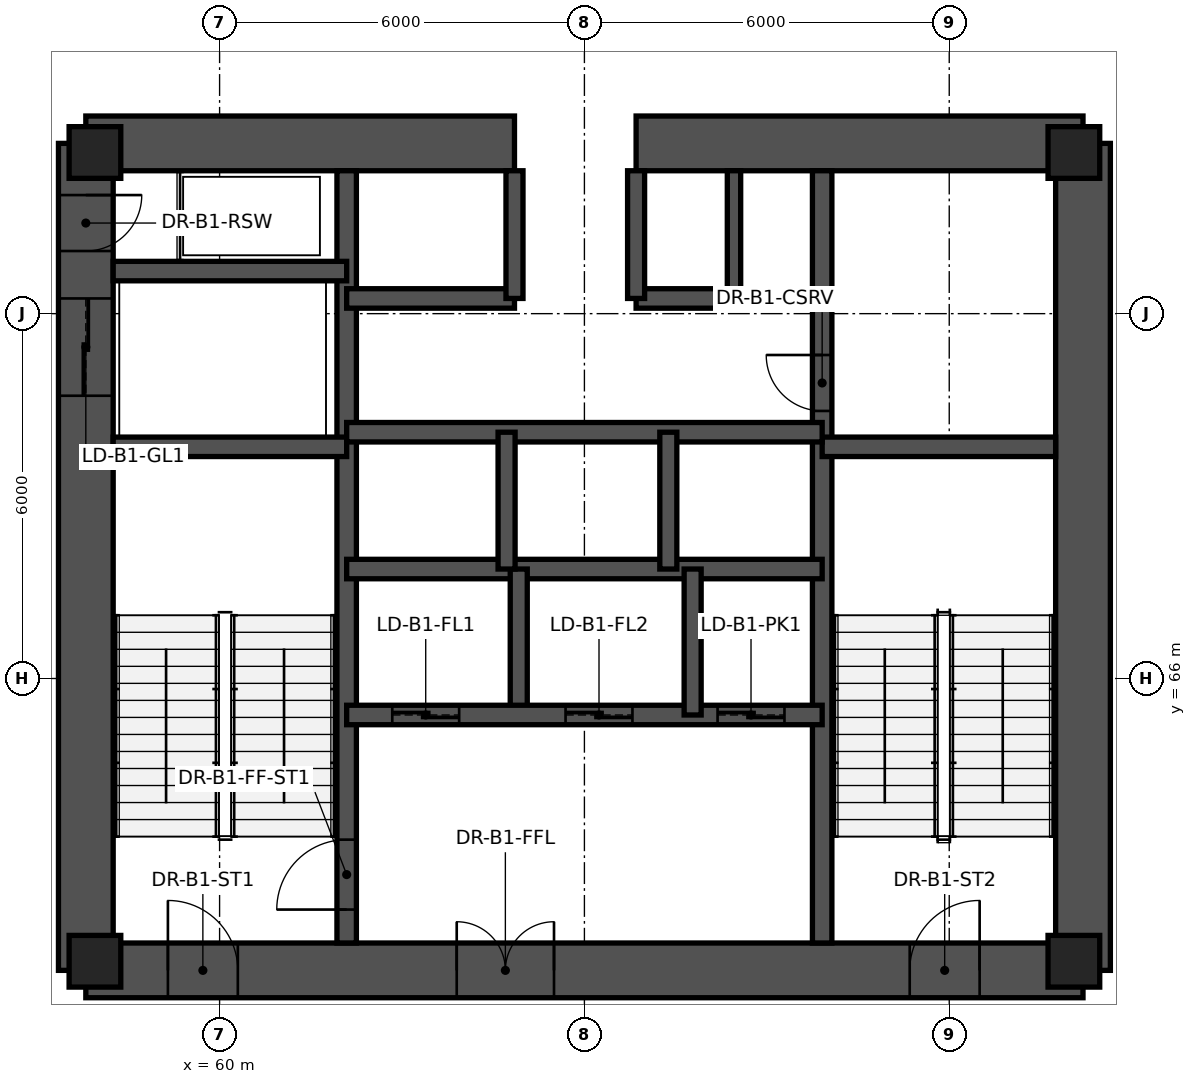
"""IFC4 building model, lengths in metres.
Left out: names, types, materials, properties, quantities, classifications, styles, units other than length and angle.
Written with IfcOpenShell. Run it as: python <this file> out.ifc"""

import sys

from ifc_helpers import new_model, si_unit, direction, frame, frame_2d, origin, origin_2d, place, context, subcontext, project, spatial, rectangle, extrude, element, fill, save


model = new_model("IFC4")
c1 = context("Model", 3, precision=1e-05, world=origin(), true_north=direction((0.0, 1.0)))
c2 = subcontext(c1, "Body", "Model", "MODEL_VIEW")
j1 = project(units=[si_unit("LENGTHUNIT", "METRE"), si_unit("PLANEANGLEUNIT", "RADIAN")], contexts=[c1])
p1 = place(None, origin())
s1 = spatial("IfcSite", under=j1, at=p1, CompositionType="ELEMENT")
p2 = place(p1, origin())
s2 = spatial("IfcBuilding", under=s1, at=p2, CompositionType="ELEMENT")
p3 = place(p2, frame((0.0, 0.0, -4.8)))
s3 = spatial("IfcBuildingStorey", under=s2, at=p3, CompositionType="ELEMENT", Elevation=-4.8)
p4 = place(p3, frame((57.8, 61.2, 0.0), z_axis=(0.0, 0.0, 1.0), x_axis=(1.0, 0.0, 0.0)))
e1 = element("IfcWall", 1, at=p4, inside=s3, PredefinedType="SHEAR", context=c2, shape_type="SweptSolid", body=[
    extrude(rectangle(XDim=16.4, YDim=0.9, at=frame_2d((8.2, 0.0))), origin(), (0.0, 0.0, 1.0), 4.8),
])
p5 = place(p4, frame((1.35, 0.0, 0.0)))
e2 = element("IfcOpeningElement", 2, at=p5, cuts=e1, PredefinedType="OPENING", context=c2, shape_type="SweptSolid", body=[
    extrude(rectangle(XDim=1.15, YDim=2.15, at=frame_2d((0.575, 1.075))), frame((0.0, 0.46, 0.0), z_axis=(0.0, -1.0, 0.0), x_axis=(1.0, 0.0, 0.0)), (0.0, 0.0, 1.0), 0.92),
])
p6 = place(p4, frame((6.1, 0.0, 0.0)))
e3 = element("IfcOpeningElement", 3, at=p6, cuts=e1, PredefinedType="OPENING", context=c2, shape_type="SweptSolid", body=[
    extrude(rectangle(XDim=1.6, YDim=2.15, at=frame_2d((0.8, 1.075))), frame((0.0, 0.46, 0.0), z_axis=(0.0, -1.0, 0.0), x_axis=(1.0, 0.0, 0.0)), (0.0, 0.0, 1.0), 0.92),
])
p7 = place(p4, frame((13.55, 0.0, 0.0)))
e4 = element("IfcOpeningElement", 4, at=p7, cuts=e1, PredefinedType="OPENING", context=c2, shape_type="SweptSolid", body=[
    extrude(rectangle(XDim=1.15, YDim=2.15, at=frame_2d((0.575, 1.075))), frame((0.0, 0.46, 0.0), z_axis=(0.0, -1.0, 0.0), x_axis=(1.0, 0.0, 0.0)), (0.0, 0.0, 1.0), 0.92),
])
p8 = place(p3, frame((74.2, 61.2, 0.0), z_axis=(0.0, 0.0, 1.0), x_axis=(0.0, 1.0, 0.0)))
e5 = element("IfcWall", 5, at=p8, inside=s3, PredefinedType="SHEAR", context=c2, shape_type="SweptSolid", body=[
    extrude(rectangle(XDim=13.6, YDim=0.9, at=frame_2d((6.8, 0.0))), origin(), (0.0, 0.0, 1.0), 4.8),
])
p9 = place(p3, frame((74.2, 74.8, 0.0), z_axis=(0.0, 0.0, 1.0), x_axis=(-1.0, 0.0, 0.0)))
e6 = element("IfcWall", 6, at=p9, inside=s3, PredefinedType="SHEAR", context=c2, shape_type="SweptSolid", body=[
    extrude(rectangle(XDim=7.35, YDim=0.9, at=frame_2d((3.675, 0.0))), origin(), (0.0, 0.0, 1.0), 4.8),
])
p10 = place(p3, frame((64.85, 74.8, 0.0), z_axis=(0.0, 0.0, 1.0), x_axis=(-1.0, 0.0, 0.0)))
e7 = element("IfcWall", 7, at=p10, inside=s3, PredefinedType="SHEAR", context=c2, shape_type="SweptSolid", body=[
    extrude(rectangle(XDim=7.05, YDim=0.9, at=frame_2d((3.525, 0.0))), origin(), (0.0, 0.0, 1.0), 4.8),
])
p11 = place(p3, frame((57.8, 74.8, 0.0), z_axis=(0.0, 0.0, 1.0), x_axis=(0.0, -1.0, 0.0)))
e8 = element("IfcWall", 8, at=p11, inside=s3, PredefinedType="SHEAR", context=c2, shape_type="SweptSolid", body=[
    extrude(rectangle(XDim=13.6, YDim=0.9, at=frame_2d((6.8, 0.0))), origin(), (0.0, 0.0, 1.0), 4.8),
])
p12 = place(p11, frame((0.85, 0.0, 0.0)))
e9 = element("IfcOpeningElement", 9, at=p12, cuts=e8, PredefinedType="OPENING", context=c2, shape_type="SweptSolid", body=[
    extrude(rectangle(XDim=0.92, YDim=2.05, at=frame_2d((0.46, 1.025))), frame((0.0, 0.46, 0.0), z_axis=(0.0, -1.0, 0.0), x_axis=(1.0, 0.0, 0.0)), (0.0, 0.0, 1.0), 0.92),
])
p13 = place(p11, frame((2.55, 0.0, 0.0)))
e10 = element("IfcOpeningElement", 10, at=p13, cuts=e8, PredefinedType="OPENING", context=c2, shape_type="SweptSolid", body=[
    extrude(rectangle(XDim=1.6, YDim=2.3, at=frame_2d((0.8, 1.15))), frame((0.0, 0.46, 0.0), z_axis=(0.0, -1.0, 0.0), x_axis=(1.0, 0.0, 0.0)), (0.0, 0.0, 1.0), 0.92),
])
p14 = place(p3, frame((62.09, 61.65, 0.0), z_axis=(0.0, 0.0, 1.0), x_axis=(0.0, 1.0, 0.0)))
e11 = element("IfcWall", 11, at=p14, inside=s3, PredefinedType="SHEAR", context=c2, shape_type="SweptSolid", body=[
    extrude(rectangle(XDim=12.7, YDim=0.32, at=frame_2d((6.35, 0.0))), origin(), (0.0, 0.0, 1.0), 4.8),
])
p15 = place(p14, frame((0.55, 0.0, 0.0)))
e12 = element("IfcOpeningElement", 12, at=p15, cuts=e11, PredefinedType="OPENING", context=c2, shape_type="SweptSolid", body=[
    extrude(rectangle(XDim=1.15, YDim=2.15, at=frame_2d((0.575, 1.075))), frame((0.0, 0.17, 0.0), z_axis=(0.0, -1.0, 0.0), x_axis=(1.0, 0.0, 0.0)), (0.0, 0.0, 1.0), 0.34),
])
p16 = place(p3, frame((69.91, 61.65, 0.0), z_axis=(0.0, 0.0, 1.0), x_axis=(0.0, 1.0, 0.0)))
e13 = element("IfcWall", 13, at=p16, inside=s3, PredefinedType="SHEAR", context=c2, shape_type="SweptSolid", body=[
    extrude(rectangle(XDim=12.7, YDim=0.32, at=frame_2d((6.35, 0.0))), origin(), (0.0, 0.0, 1.0), 4.8),
])
p17 = place(p16, frame((8.75, 0.0, 0.0)))
e14 = element("IfcOpeningElement", 14, at=p17, cuts=e13, PredefinedType="OPENING", context=c2, shape_type="SweptSolid", body=[
    extrude(rectangle(XDim=0.92, YDim=2.05, at=frame_2d((0.46, 1.025))), frame((0.0, 0.17, 0.0), z_axis=(0.0, -1.0, 0.0), x_axis=(1.0, 0.0, 0.0)), (0.0, 0.0, 1.0), 0.34),
])
for number, where, z_axis, x_axis in (
    (15, (58.25, 69.81, 0.0), (0.0, 0.0, 1.0), (1.0, 0.0, 0.0)),
    (16, (69.91, 69.81, 0.0), (0.0, 0.0, 1.0), (1.0, 0.0, 0.0)),
    (17, (58.25, 72.7, 0.0), (0.0, 0.0, 1.0), (1.0, 0.0, 0.0)),
):
    element("IfcWall", number, at=place(p3, frame(where, z_axis=z_axis, x_axis=x_axis)), inside=s3, PredefinedType="SHEAR", context=c2, shape_type="SweptSolid", body=[
        extrude(rectangle(XDim=3.84, YDim=0.32, at=frame_2d((1.92, 0.0))), origin(), (0.0, 0.0, 1.0), 4.8),
    ])
p18 = place(p3, frame((62.09, 67.8, 0.0), z_axis=(0.0, 0.0, 1.0), x_axis=(1.0, 0.0, 0.0)))
e18 = element("IfcWall", 18, at=p18, inside=s3, PredefinedType="SHEAR", context=c2, shape_type="SweptSolid", body=[
    extrude(rectangle(XDim=7.82, YDim=0.32, at=frame_2d((3.91, 0.0))), origin(), (0.0, 0.0, 1.0), 4.8),
])
p19 = place(p3, frame((64.92, 65.4, 0.0), z_axis=(0.0, 0.0, 1.0), x_axis=(0.0, 1.0, 0.0)))
e19 = element("IfcWall", 19, at=p19, inside=s3, PredefinedType="SHEAR", context=c2, shape_type="SweptSolid", body=[
    extrude(rectangle(XDim=2.4, YDim=0.28, at=frame_2d((1.2, 0.0))), origin(), (0.0, 0.0, 1.0), 4.8),
])
p20 = place(p3, frame((62.09, 70.05, 0.0), z_axis=(0.0, 0.0, 1.0), x_axis=(1.0, 0.0, 0.0)))
e20 = element("IfcWall", 20, at=p20, inside=s3, PredefinedType="SHEAR", context=c2, shape_type="SweptSolid", body=[
    extrude(rectangle(XDim=7.82, YDim=0.32, at=frame_2d((3.91, 0.0))), origin(), (0.0, 0.0, 1.0), 4.8),
])
p21 = place(p3, frame((62.09, 72.25, 0.0), z_axis=(0.0, 0.0, 1.0), x_axis=(1.0, 0.0, 0.0)))
e21 = element("IfcWall", 21, at=p21, inside=s3, PredefinedType="SHEAR", context=c2, shape_type="SweptSolid", body=[
    extrude(rectangle(XDim=2.76, YDim=0.32, at=frame_2d((1.38, 0.0))), origin(), (0.0, 0.0, 1.0), 4.8),
])
p22 = place(p3, frame((66.85, 72.25, 0.0), z_axis=(0.0, 0.0, 1.0), x_axis=(1.0, 0.0, 0.0)))
e22 = element("IfcWall", 22, at=p22, inside=s3, PredefinedType="SHEAR", context=c2, shape_type="SweptSolid", body=[
    extrude(rectangle(XDim=3.06, YDim=0.32, at=frame_2d((1.53, 0.0))), origin(), (0.0, 0.0, 1.0), 4.8),
])
for number, where, z_axis, x_axis in (
    (23, (64.85, 72.25, 0.0), (0.0, 0.0, 1.0), (0.0, 1.0, 0.0)),
    (24, (66.85, 72.25, 0.0), (0.0, 0.0, 1.0), (0.0, 1.0, 0.0)),
):
    element("IfcWall", number, at=place(p3, frame(where, z_axis=z_axis, x_axis=x_axis)), inside=s3, PredefinedType="SHEAR", context=c2, shape_type="SweptSolid", body=[
        extrude(rectangle(XDim=2.1, YDim=0.28, at=frame_2d((1.05, 0.0))), origin(), (0.0, 0.0, 1.0), 4.8),
    ])
p23 = place(p3, frame((68.46, 72.25, 0.0), z_axis=(0.0, 0.0, 1.0), x_axis=(0.0, 1.0, 0.0)))
e25 = element("IfcWall", 25, at=p23, inside=s3, PredefinedType="SHEAR", context=c2, shape_type="SweptSolid", body=[
    extrude(rectangle(XDim=2.1, YDim=0.22, at=frame_2d((1.05, 0.0))), origin(), (0.0, 0.0, 1.0), 4.8),
])
p24 = place(p3, frame((62.09, 65.4, 0.0), z_axis=(0.0, 0.0, 1.0), x_axis=(1.0, 0.0, 0.0)))
e26 = element("IfcWall", 26, at=p24, inside=s3, PredefinedType="SHEAR", context=c2, shape_type="SweptSolid", body=[
    extrude(rectangle(XDim=7.82, YDim=0.32, at=frame_2d((3.91, 0.0))), origin(), (0.0, 0.0, 1.0), 4.8),
])
p25 = place(p24, frame((6.1, 0.0, 0.0)))
e27 = element("IfcOpeningElement", 27, at=p25, cuts=e26, PredefinedType="OPENING", context=c2, shape_type="SweptSolid", body=[
    extrude(rectangle(XDim=1.1, YDim=2.2, at=frame_2d((0.55, 1.1))), frame((0.0, 0.17, 0.0), z_axis=(0.0, -1.0, 0.0), x_axis=(1.0, 0.0, 0.0)), (0.0, 0.0, 1.0), 0.34),
])
p26 = place(p24, frame((0.75, 0.0, 0.0)))
e28 = element("IfcOpeningElement", 28, at=p26, cuts=e26, PredefinedType="OPENING", context=c2, shape_type="SweptSolid", body=[
    extrude(rectangle(XDim=1.1, YDim=2.2, at=frame_2d((0.55, 1.1))), frame((0.0, 0.17, 0.0), z_axis=(0.0, -1.0, 0.0), x_axis=(1.0, 0.0, 0.0)), (0.0, 0.0, 1.0), 0.34),
])
p27 = place(p24, frame((3.6, 0.0, 0.0)))
e29 = element("IfcOpeningElement", 29, at=p27, cuts=e26, PredefinedType="OPENING", context=c2, shape_type="SweptSolid", body=[
    extrude(rectangle(XDim=1.1, YDim=2.2, at=frame_2d((0.55, 1.1))), frame((0.0, 0.17, 0.0), z_axis=(0.0, -1.0, 0.0), x_axis=(1.0, 0.0, 0.0)), (0.0, 0.0, 1.0), 0.34),
])
p28 = place(p3, frame((67.78, 65.4, 0.0), z_axis=(0.0, 0.0, 1.0), x_axis=(0.0, 1.0, 0.0)))
e30 = element("IfcWall", 30, at=p28, inside=s3, PredefinedType="SHEAR", context=c2, shape_type="SweptSolid", body=[
    extrude(rectangle(XDim=2.4, YDim=0.28, at=frame_2d((1.2, 0.0))), origin(), (0.0, 0.0, 1.0), 4.8),
])
for number, where, z_axis, x_axis in (
    (31, (64.72, 67.8, 0.0), (0.0, 0.0, 1.0), (0.0, 1.0, 0.0)),
    (32, (67.38, 67.8, 0.0), (0.0, 0.0, 1.0), (0.0, 1.0, 0.0)),
):
    element("IfcWall", number, at=place(p3, frame(where, z_axis=z_axis, x_axis=x_axis)), inside=s3, PredefinedType="SHEAR", context=c2, shape_type="SweptSolid", body=[
        extrude(rectangle(XDim=2.25, YDim=0.28, at=frame_2d((1.125, 0.0))), origin(), (0.0, 0.0, 1.0), 4.8),
    ])
for number, where, z_axis, x_axis in (
    (33, (57.95, 61.35, 0.0), (0.0, 0.0, 1.0), (1.0, 0.0, 0.0)),
    (34, (74.05, 61.35, 0.0), (0.0, 0.0, 1.0), (1.0, 0.0, 0.0)),
    (35, (74.05, 74.65, 0.0), (0.0, 0.0, 1.0), (1.0, 0.0, 0.0)),
    (36, (57.95, 74.65, 0.0), (0.0, 0.0, 1.0), (1.0, 0.0, 0.0)),
):
    element("IfcColumn", number, at=place(p3, frame(where, z_axis=z_axis, x_axis=x_axis)), inside=s3, PredefinedType="COLUMN", context=c2, shape_type="SweptSolid", body=[
        extrude(rectangle(XDim=0.85, YDim=0.85, at=origin_2d()), origin(), (0.0, 0.0, 1.0), 4.8),
    ])
p29 = place(p15, origin())
e37 = element("IfcDoor", 37, at=p29, inside=s3, OperationType="SINGLE_SWING_LEFT", PredefinedType="DOOR", context=c2, shape_type="SweptSolid", body=[
    extrude(rectangle(XDim=1.15, YDim=2.15, at=frame_2d((0.575, 1.075))), frame((0.0, 0.025, 0.0), z_axis=(0.0, -1.0, 0.0), x_axis=(1.0, 0.0, 0.0)), (0.0, 0.0, 1.0), 0.05),
])
fill(e12, e37)
p30 = place(p25, origin())
e38 = element("IfcDoor", 38, at=p30, inside=s3, OperationType="SLIDING_TO_LEFT", PredefinedType="DOOR", context=c2, shape_type="SweptSolid", body=[
    extrude(rectangle(XDim=1.1, YDim=2.2, at=frame_2d((0.55, 1.1))), frame((0.0, 0.025, 0.0), z_axis=(0.0, -1.0, 0.0), x_axis=(1.0, 0.0, 0.0)), (0.0, 0.0, 1.0), 0.05),
])
fill(e27, e38)
p31 = place(p26, origin())
e39 = element("IfcDoor", 39, at=p31, inside=s3, OperationType="SLIDING_TO_LEFT", PredefinedType="DOOR", context=c2, shape_type="SweptSolid", body=[
    extrude(rectangle(XDim=1.1, YDim=2.2, at=frame_2d((0.55, 1.1))), frame((0.0, 0.025, 0.0), z_axis=(0.0, -1.0, 0.0), x_axis=(1.0, 0.0, 0.0)), (0.0, 0.0, 1.0), 0.05),
])
fill(e28, e39)
p32 = place(p27, origin())
e40 = element("IfcDoor", 40, at=p32, inside=s3, OperationType="SLIDING_TO_LEFT", PredefinedType="DOOR", context=c2, shape_type="SweptSolid", body=[
    extrude(rectangle(XDim=1.1, YDim=2.2, at=frame_2d((0.55, 1.1))), frame((0.0, 0.025, 0.0), z_axis=(0.0, -1.0, 0.0), x_axis=(1.0, 0.0, 0.0)), (0.0, 0.0, 1.0), 0.05),
])
fill(e29, e40)
p33 = place(p5, origin())
e41 = element("IfcDoor", 41, at=p33, inside=s3, OperationType="SINGLE_SWING_LEFT", PredefinedType="DOOR", context=c2, shape_type="SweptSolid", body=[
    extrude(rectangle(XDim=1.15, YDim=2.15, at=frame_2d((0.575, 1.075))), frame((0.0, 0.025, 0.0), z_axis=(0.0, -1.0, 0.0), x_axis=(1.0, 0.0, 0.0)), (0.0, 0.0, 1.0), 0.05),
])
fill(e2, e41)
p34 = place(p6, origin())
e42 = element("IfcDoor", 42, at=p34, inside=s3, OperationType="DOUBLE_DOOR_SINGLE_SWING", PredefinedType="DOOR", context=c2, shape_type="SweptSolid", body=[
    extrude(rectangle(XDim=1.6, YDim=2.15, at=frame_2d((0.8, 1.075))), frame((0.0, 0.025, 0.0), z_axis=(0.0, -1.0, 0.0), x_axis=(1.0, 0.0, 0.0)), (0.0, 0.0, 1.0), 0.05),
])
fill(e3, e42)
p35 = place(p7, origin())
e43 = element("IfcDoor", 43, at=p35, inside=s3, OperationType="SINGLE_SWING_RIGHT", PredefinedType="DOOR", context=c2, shape_type="SweptSolid", body=[
    extrude(rectangle(XDim=1.15, YDim=2.15, at=frame_2d((0.575, 1.075))), frame((0.0, 0.025, 0.0), z_axis=(0.0, -1.0, 0.0), x_axis=(1.0, 0.0, 0.0)), (0.0, 0.0, 1.0), 0.05),
])
fill(e4, e43)
p36 = place(p12, origin())
e44 = element("IfcDoor", 44, at=p36, inside=s3, OperationType="SINGLE_SWING_LEFT", PredefinedType="DOOR", context=c2, shape_type="SweptSolid", body=[
    extrude(rectangle(XDim=0.92, YDim=2.05, at=frame_2d((0.46, 1.025))), frame((0.0, 0.025, 0.0), z_axis=(0.0, -1.0, 0.0), x_axis=(1.0, 0.0, 0.0)), (0.0, 0.0, 1.0), 0.05),
])
fill(e9, e44)
p37 = place(p13, origin())
e45 = element("IfcDoor", 45, at=p37, inside=s3, OperationType="DOUBLE_DOOR_SLIDING", PredefinedType="DOOR", context=c2, shape_type="SweptSolid", body=[
    extrude(rectangle(XDim=1.6, YDim=2.3, at=frame_2d((0.8, 1.15))), frame((0.0, 0.025, 0.0), z_axis=(0.0, -1.0, 0.0), x_axis=(1.0, 0.0, 0.0)), (0.0, 0.0, 1.0), 0.05),
])
fill(e10, e45)
p38 = place(p17, origin())
e46 = element("IfcDoor", 46, at=p38, inside=s3, OperationType="SINGLE_SWING_RIGHT", PredefinedType="DOOR", context=c2, shape_type="SweptSolid", body=[
    extrude(rectangle(XDim=0.92, YDim=2.05, at=frame_2d((0.46, 1.025))), frame((0.0, 0.025, 0.0), z_axis=(0.0, -1.0, 0.0), x_axis=(1.0, 0.0, 0.0)), (0.0, 0.0, 1.0), 0.05),
])
fill(e14, e46)
save(model, sys.argv[1])
